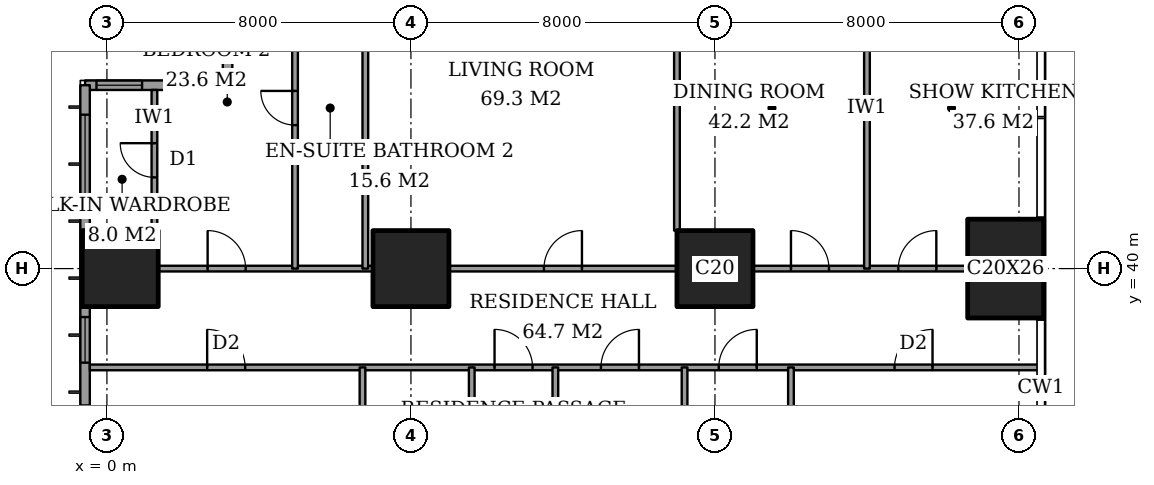
"""IFC4 building model, lengths in metres.
Left out: names, types, materials, properties, quantities, classifications, styles, units other than length and angle.
Written with IfcOpenShell. Run it as: python <this file> out.ifc"""

import sys

from ifc_helpers import new_model, si_unit, direction, frame, frame_2d, origin, origin_2d, place, context, subcontext, project, spatial, rectangle, extrude, element, fill, save


model = new_model("IFC4")
c1 = context("Model", 3, precision=1e-05, world=origin(), true_north=direction((0.0, 1.0)))
c2 = subcontext(c1, "Body", "Model", "MODEL_VIEW")
j1 = project(units=[si_unit("LENGTHUNIT", "METRE"), si_unit("PLANEANGLEUNIT", "RADIAN")], contexts=[c1])
p1 = place(None, origin())
s1 = spatial("IfcSite", under=j1, at=p1, CompositionType="ELEMENT")
p2 = place(p1, origin())
s2 = spatial("IfcBuilding", under=s1, at=p2, CompositionType="ELEMENT")
p3 = place(p2, frame((0.0, 0.0, 143.0)))
s3 = spatial("IfcBuildingStorey", under=s2, at=p3, CompositionType="ELEMENT", Elevation=143.0)
for number, where, z_axis, x_axis in (
    (1, (0.35, 40.0, 0.0), (0.0, 0.0, 1.0), (1.0, 0.0, 0.0)),
    (2, (8.0, 40.0, 0.0), (0.0, 0.0, 1.0), (1.0, 0.0, 0.0)),
    (3, (16.0, 40.0, 0.0), (0.0, 0.0, 1.0), (1.0, 0.0, 0.0)),
):
    element("IfcColumn", number, at=place(p3, frame(where, z_axis=z_axis, x_axis=x_axis)), inside=s3, PredefinedType="COLUMN", context=c2, shape_type="SweptSolid", body=[
        extrude(rectangle(XDim=2.0, YDim=2.0, at=origin_2d()), origin(), (0.0, 0.0, 1.0), 3.6),
    ])
p4 = place(p3, frame((23.65, 40.0, 0.0), z_axis=(0.0, 0.0, 1.0), x_axis=(1.0, 0.0, 0.0)))
e4 = element("IfcColumn", 4, at=p4, inside=s3, PredefinedType="COLUMN", context=c2, shape_type="SweptSolid", body=[
    extrude(rectangle(XDim=2.0, YDim=2.6, at=origin_2d()), origin(), (0.0, 0.0, 1.0), 3.6),
])
p5 = place(p3, frame((3.175, 48.575, 0.0), z_axis=(0.0, 0.0, 1.0), x_axis=(0.0, -1.0, 0.0)))
e5 = element("IfcWall", 5, at=p5, inside=s3, PredefinedType="SOLIDWALL", context=c2, shape_type="SweptSolid", body=[
    extrude(rectangle(XDim=3.75, YDim=0.25, at=frame_2d((1.875, 0.0))), origin(), (0.0, 0.0, 1.0), 3.6),
])
p6 = place(p5, frame((0.738, 0.0, 0.4)))
e6 = element("IfcOpeningElement", 6, at=p6, cuts=e5, PredefinedType="OPENING", context=c2, shape_type="SweptSolid", body=[
    extrude(rectangle(XDim=2.4, YDim=2.2, at=frame_2d((1.2, 1.1))), frame((0.0, 0.135, 0.0), z_axis=(0.0, -1.0, 0.0), x_axis=(1.0, 0.0, 0.0)), (0.0, 0.0, 1.0), 0.27),
])
p7 = place(p3, frame((3.175, 44.825, 0.0), z_axis=(0.0, 0.0, 1.0), x_axis=(-1.0, 0.0, 0.0)))
e7 = element("IfcWall", 7, at=p7, inside=s3, PredefinedType="SOLIDWALL", context=c2, shape_type="SweptSolid", body=[
    extrude(rectangle(XDim=3.75, YDim=0.25, at=frame_2d((1.875, 0.0))), origin(), (0.0, 0.0, 1.0), 3.6),
])
p8 = place(p7, frame((0.363, 0.0, 0.4)))
e8 = element("IfcOpeningElement", 8, at=p8, cuts=e7, PredefinedType="OPENING", context=c2, shape_type="SweptSolid", body=[
    extrude(rectangle(XDim=1.2, YDim=2.2, at=frame_2d((0.6, 1.1))), frame((0.0, 0.135, 0.0), z_axis=(0.0, -1.0, 0.0), x_axis=(1.0, 0.0, 0.0)), (0.0, 0.0, 1.0), 0.27),
])
p9 = place(p7, frame((2.25, 0.0, 0.4)))
e9 = element("IfcOpeningElement", 9, at=p9, cuts=e7, PredefinedType="OPENING", context=c2, shape_type="SweptSolid", body=[
    extrude(rectangle(XDim=1.2, YDim=2.2, at=frame_2d((0.6, 1.1))), frame((0.0, 0.135, 0.0), z_axis=(0.0, -1.0, 0.0), x_axis=(1.0, 0.0, 0.0)), (0.0, 0.0, 1.0), 0.27),
])
p10 = place(p3, frame((-0.575, 44.825, 0.0), z_axis=(0.0, 0.0, 1.0), x_axis=(0.0, -1.0, 0.0)))
e10 = element("IfcWall", 10, at=p10, inside=s3, PredefinedType="SOLIDWALL", context=c2, shape_type="SweptSolid", body=[
    extrude(rectangle(XDim=41.65, YDim=0.25, at=frame_2d((20.825, 0.0))), origin(), (0.0, 0.0, 1.0), 3.6),
])
p11 = place(p10, frame((0.775, 0.0, 0.4)))
e11 = element("IfcOpeningElement", 11, at=p11, cuts=e10, PredefinedType="OPENING", context=c2, shape_type="SweptSolid", body=[
    extrude(rectangle(XDim=2.4, YDim=2.2, at=frame_2d((1.2, 1.1))), frame((0.0, 0.135, 0.0), z_axis=(0.0, -1.0, 0.0), x_axis=(1.0, 0.0, 0.0)), (0.0, 0.0, 1.0), 0.27),
])
p12 = place(p10, frame((6.1, 0.0, 0.4)))
e12 = element("IfcOpeningElement", 12, at=p12, cuts=e10, PredefinedType="OPENING", context=c2, shape_type="SweptSolid", body=[
    extrude(rectangle(XDim=1.2, YDim=2.2, at=frame_2d((0.6, 1.1))), frame((0.0, 0.135, 0.0), z_axis=(0.0, -1.0, 0.0), x_axis=(1.0, 0.0, 0.0)), (0.0, 0.0, 1.0), 0.27),
])
p13 = place(p10, frame((8.425, 0.0, 0.4)))
e13 = element("IfcOpeningElement", 13, at=p13, cuts=e10, PredefinedType="OPENING", context=c2, shape_type="SweptSolid", body=[
    extrude(rectangle(XDim=2.4, YDim=2.2, at=frame_2d((1.2, 1.1))), frame((0.0, 0.135, 0.0), z_axis=(0.0, -1.0, 0.0), x_axis=(1.0, 0.0, 0.0)), (0.0, 0.0, 1.0), 0.27),
])
p14 = place(p10, frame((15.625, 0.0, 0.4)))
e14 = element("IfcOpeningElement", 14, at=p14, cuts=e10, PredefinedType="OPENING", context=c2, shape_type="SweptSolid", body=[
    extrude(rectangle(XDim=2.4, YDim=2.2, at=frame_2d((1.2, 1.1))), frame((0.0, 0.135, 0.0), z_axis=(0.0, -1.0, 0.0), x_axis=(1.0, 0.0, 0.0)), (0.0, 0.0, 1.0), 0.27),
])
p15 = place(p10, frame((23.625, 0.0, 0.4)))
e15 = element("IfcOpeningElement", 15, at=p15, cuts=e10, PredefinedType="OPENING", context=c2, shape_type="SweptSolid", body=[
    extrude(rectangle(XDim=2.4, YDim=2.2, at=frame_2d((1.2, 1.1))), frame((0.0, 0.135, 0.0), z_axis=(0.0, -1.0, 0.0), x_axis=(1.0, 0.0, 0.0)), (0.0, 0.0, 1.0), 0.27),
])
p16 = place(p10, frame((30.625, 0.0, 0.4)))
e16 = element("IfcOpeningElement", 16, at=p16, cuts=e10, PredefinedType="OPENING", context=c2, shape_type="SweptSolid", body=[
    extrude(rectangle(XDim=2.4, YDim=2.2, at=frame_2d((1.2, 1.1))), frame((0.0, 0.135, 0.0), z_axis=(0.0, -1.0, 0.0), x_axis=(1.0, 0.0, 0.0)), (0.0, 0.0, 1.0), 0.27),
])
p17 = place(p10, frame((34.225, 0.0, 0.4)))
e17 = element("IfcOpeningElement", 17, at=p17, cuts=e10, PredefinedType="OPENING", context=c2, shape_type="SweptSolid", body=[
    extrude(rectangle(XDim=1.2, YDim=2.2, at=frame_2d((0.6, 1.1))), frame((0.0, 0.135, 0.0), z_axis=(0.0, -1.0, 0.0), x_axis=(1.0, 0.0, 0.0)), (0.0, 0.0, 1.0), 0.27),
])
p18 = place(p10, frame((38.475, 0.0, 0.4)))
e18 = element("IfcOpeningElement", 18, at=p18, cuts=e10, PredefinedType="OPENING", context=c2, shape_type="SweptSolid", body=[
    extrude(rectangle(XDim=2.4, YDim=2.2, at=frame_2d((1.2, 1.1))), frame((0.0, 0.135, 0.0), z_axis=(0.0, -1.0, 0.0), x_axis=(1.0, 0.0, 0.0)), (0.0, 0.0, 1.0), 0.27),
])
p19 = place(p3, frame((-0.45, 37.4, 0.0), z_axis=(0.0, 0.0, 1.0), x_axis=(1.0, 0.0, 0.0)))
e19 = element("IfcWall", 19, at=p19, inside=s3, PredefinedType="PARTITIONING", context=c2, shape_type="SweptSolid", body=[
    extrude(rectangle(XDim=25.011, YDim=0.15, at=frame_2d((12.505, 0.0))), origin(), (0.0, 0.0, 1.0), 3.35),
])
p20 = place(p19, frame((10.65, 0.0, 0.0)))
e20 = element("IfcOpeningElement", 20, at=p20, cuts=e19, PredefinedType="OPENING", context=c2, shape_type="SweptSolid", body=[
    extrude(rectangle(XDim=1.0, YDim=2.1, at=frame_2d((0.5, 1.05))), frame((0.0, 0.085, 0.0), z_axis=(0.0, -1.0, 0.0), x_axis=(1.0, 0.0, 0.0)), (0.0, 0.0, 1.0), 0.17),
])
p21 = place(p19, frame((3.087, 0.0, 0.0)))
e21 = element("IfcOpeningElement", 21, at=p21, cuts=e19, PredefinedType="OPENING", context=c2, shape_type="SweptSolid", body=[
    extrude(rectangle(XDim=1.0, YDim=2.1, at=frame_2d((0.5, 1.05))), frame((0.0, 0.085, 0.0), z_axis=(0.0, -1.0, 0.0), x_axis=(1.0, 0.0, 0.0)), (0.0, 0.0, 1.0), 0.17),
])
p22 = place(p19, frame((13.45, 0.0, 0.0)))
e22 = element("IfcOpeningElement", 22, at=p22, cuts=e19, PredefinedType="OPENING", context=c2, shape_type="SweptSolid", body=[
    extrude(rectangle(XDim=1.0, YDim=2.1, at=frame_2d((0.5, 1.05))), frame((0.0, 0.085, 0.0), z_axis=(0.0, -1.0, 0.0), x_axis=(1.0, 0.0, 0.0)), (0.0, 0.0, 1.0), 0.17),
])
p23 = place(p19, frame((16.55, 0.0, 0.0)))
e23 = element("IfcOpeningElement", 23, at=p23, cuts=e19, PredefinedType="OPENING", context=c2, shape_type="SweptSolid", body=[
    extrude(rectangle(XDim=1.0, YDim=2.1, at=frame_2d((0.5, 1.05))), frame((0.0, 0.085, 0.0), z_axis=(0.0, -1.0, 0.0), x_axis=(1.0, 0.0, 0.0)), (0.0, 0.0, 1.0), 0.17),
])
p24 = place(p19, frame((21.175, 0.0, 0.0)))
e24 = element("IfcOpeningElement", 24, at=p24, cuts=e19, PredefinedType="OPENING", context=c2, shape_type="SweptSolid", body=[
    extrude(rectangle(XDim=1.0, YDim=2.1, at=frame_2d((0.5, 1.05))), frame((0.0, 0.085, 0.0), z_axis=(0.0, -1.0, 0.0), x_axis=(1.0, 0.0, 0.0)), (0.0, 0.0, 1.0), 0.17),
])
p25 = place(p3, frame((1.35, 40.0, 0.0), z_axis=(0.0, 0.0, 1.0), x_axis=(1.0, 0.0, 0.0)))
e25 = element("IfcWall", 25, at=p25, inside=s3, PredefinedType="PARTITIONING", context=c2, shape_type="SweptSolid", body=[
    extrude(rectangle(XDim=5.65, YDim=0.15, at=frame_2d((2.825, 0.0))), origin(), (0.0, 0.0, 1.0), 3.35),
])
p26 = place(p25, frame((1.3, 0.0, 0.0)))
e26 = element("IfcOpeningElement", 26, at=p26, cuts=e25, PredefinedType="OPENING", context=c2, shape_type="SweptSolid", body=[
    extrude(rectangle(XDim=1.0, YDim=2.1, at=frame_2d((0.5, 1.05))), frame((0.0, 0.085, 0.0), z_axis=(0.0, -1.0, 0.0), x_axis=(1.0, 0.0, 0.0)), (0.0, 0.0, 1.0), 0.17),
])
p27 = place(p3, frame((9.0, 40.0, 0.0), z_axis=(0.0, 0.0, 1.0), x_axis=(1.0, 0.0, 0.0)))
e27 = element("IfcWall", 27, at=p27, inside=s3, PredefinedType="PARTITIONING", context=c2, shape_type="SweptSolid", body=[
    extrude(rectangle(XDim=6.0, YDim=0.15, at=frame_2d((3.0, 0.0))), origin(), (0.0, 0.0, 1.0), 3.35),
])
p28 = place(p27, frame((2.5, 0.0, 0.0)))
e28 = element("IfcOpeningElement", 28, at=p28, cuts=e27, PredefinedType="OPENING", context=c2, shape_type="SweptSolid", body=[
    extrude(rectangle(XDim=1.0, YDim=2.1, at=frame_2d((0.5, 1.05))), frame((0.0, 0.085, 0.0), z_axis=(0.0, -1.0, 0.0), x_axis=(1.0, 0.0, 0.0)), (0.0, 0.0, 1.0), 0.17),
])
p29 = place(p3, frame((17.0, 40.0, 0.0), z_axis=(0.0, 0.0, 1.0), x_axis=(1.0, 0.0, 0.0)))
e29 = element("IfcWall", 29, at=p29, inside=s3, PredefinedType="PARTITIONING", context=c2, shape_type="SweptSolid", body=[
    extrude(rectangle(XDim=5.65, YDim=0.15, at=frame_2d((2.825, 0.0))), origin(), (0.0, 0.0, 1.0), 3.35),
])
p30 = place(p29, frame((1.0, 0.0, 0.0)))
e30 = element("IfcOpeningElement", 30, at=p30, cuts=e29, PredefinedType="OPENING", context=c2, shape_type="SweptSolid", body=[
    extrude(rectangle(XDim=1.0, YDim=2.1, at=frame_2d((0.5, 1.05))), frame((0.0, 0.085, 0.0), z_axis=(0.0, -1.0, 0.0), x_axis=(1.0, 0.0, 0.0)), (0.0, 0.0, 1.0), 0.17),
])
p31 = place(p29, frame((3.825, 0.0, 0.0)))
e31 = element("IfcOpeningElement", 31, at=p31, cuts=e29, PredefinedType="OPENING", context=c2, shape_type="SweptSolid", body=[
    extrude(rectangle(XDim=1.0, YDim=2.1, at=frame_2d((0.5, 1.05))), frame((0.0, 0.085, 0.0), z_axis=(0.0, -1.0, 0.0), x_axis=(1.0, 0.0, 0.0)), (0.0, 0.0, 1.0), 0.17),
])
p32 = place(p3, frame((1.25, 41.0, 0.0), z_axis=(0.0, 0.0, 1.0), x_axis=(0.0, 1.0, 0.0)))
e32 = element("IfcWall", 32, at=p32, inside=s3, PredefinedType="PARTITIONING", context=c2, shape_type="SweptSolid", body=[
    extrude(rectangle(XDim=3.7, YDim=0.15, at=frame_2d((1.85, 0.0))), origin(), (0.0, 0.0, 1.0), 3.35),
])
p33 = place(p32, frame((1.4, 0.0, 0.0)))
e33 = element("IfcOpeningElement", 33, at=p33, cuts=e32, PredefinedType="OPENING", context=c2, shape_type="SweptSolid", body=[
    extrude(rectangle(XDim=0.9, YDim=2.1, at=frame_2d((0.45, 1.05))), frame((0.0, 0.085, 0.0), z_axis=(0.0, -1.0, 0.0), x_axis=(1.0, 0.0, 0.0)), (0.0, 0.0, 1.0), 0.17),
])
p34 = place(p3, frame((4.95, 40.0, 0.0), z_axis=(0.0, 0.0, 1.0), x_axis=(0.0, 1.0, 0.0)))
e34 = element("IfcWall", 34, at=p34, inside=s3, PredefinedType="PARTITIONING", context=c2, shape_type="SweptSolid", body=[
    extrude(rectangle(XDim=8.45, YDim=0.15, at=frame_2d((4.225, 0.0))), origin(), (0.0, 0.0, 1.0), 3.35),
])
p35 = place(p34, frame((3.775, 0.0, 0.0)))
e35 = element("IfcOpeningElement", 35, at=p35, cuts=e34, PredefinedType="OPENING", context=c2, shape_type="SweptSolid", body=[
    extrude(rectangle(XDim=0.9, YDim=2.1, at=frame_2d((0.45, 1.05))), frame((0.0, 0.085, 0.0), z_axis=(0.0, -1.0, 0.0), x_axis=(1.0, 0.0, 0.0)), (0.0, 0.0, 1.0), 0.17),
])
p36 = place(p3, frame((6.725, 33.2, 0.0), z_axis=(0.0, 0.0, 1.0), x_axis=(0.0, 1.0, 0.0)))
e36 = element("IfcWall", 36, at=p36, inside=s3, PredefinedType="PARTITIONING", context=c2, shape_type="SweptSolid", body=[
    extrude(rectangle(XDim=4.2, YDim=0.15, at=frame_2d((2.1, 0.0))), origin(), (0.0, 0.0, 1.0), 3.35),
])
p37 = place(p36, frame((2.1, 0.0, 0.0)))
e37 = element("IfcOpeningElement", 37, at=p37, cuts=e36, PredefinedType="OPENING", context=c2, shape_type="SweptSolid", body=[
    extrude(rectangle(XDim=0.9, YDim=2.1, at=frame_2d((0.45, 1.05))), frame((0.0, 0.085, 0.0), z_axis=(0.0, -1.0, 0.0), x_axis=(1.0, 0.0, 0.0)), (0.0, 0.0, 1.0), 0.17),
])
p38 = place(p3, frame((6.8, 40.0, 0.0), z_axis=(0.0, 0.0, 1.0), x_axis=(0.0, 1.0, 0.0)))
e38 = element("IfcWall", 38, at=p38, inside=s3, PredefinedType="PARTITIONING", context=c2, shape_type="SweptSolid", body=[
    extrude(rectangle(XDim=8.45, YDim=0.15, at=frame_2d((4.225, 0.0))), origin(), (0.0, 0.0, 1.0), 3.35),
])
p39 = place(p3, frame((9.6, 28.0, 0.0), z_axis=(0.0, 0.0, 1.0), x_axis=(0.0, 1.0, 0.0)))
e39 = element("IfcWall", 39, at=p39, inside=s3, PredefinedType="PARTITIONING", context=c2, shape_type="SweptSolid", body=[
    extrude(rectangle(XDim=9.4, YDim=0.15, at=frame_2d((4.7, 0.0))), origin(), (0.0, 0.0, 1.0), 3.35),
])
p40 = place(p39, frame((0.5, 0.0, 0.0)))
e40 = element("IfcOpeningElement", 40, at=p40, cuts=e39, PredefinedType="OPENING", context=c2, shape_type="SweptSolid", body=[
    extrude(rectangle(XDim=1.0, YDim=2.1, at=frame_2d((0.5, 1.05))), frame((0.0, 0.085, 0.0), z_axis=(0.0, -1.0, 0.0), x_axis=(1.0, 0.0, 0.0)), (0.0, 0.0, 1.0), 0.17),
])
p41 = place(p3, frame((11.8, 30.0, 0.0), z_axis=(0.0, 0.0, 1.0), x_axis=(0.0, 1.0, 0.0)))
e41 = element("IfcWall", 41, at=p41, inside=s3, PredefinedType="PARTITIONING", context=c2, shape_type="SweptSolid", body=[
    extrude(rectangle(XDim=7.4, YDim=0.15, at=frame_2d((3.7, 0.0))), origin(), (0.0, 0.0, 1.0), 3.35),
])
p42 = place(p3, frame((15.0, 41.0, 0.0), z_axis=(0.0, 0.0, 1.0), x_axis=(0.0, 1.0, 0.0)))
e42 = element("IfcWall", 42, at=p42, inside=s3, PredefinedType="PARTITIONING", context=c2, shape_type="SweptSolid", body=[
    extrude(rectangle(XDim=5.65, YDim=0.15, at=frame_2d((2.825, 0.0))), origin(), (0.0, 0.0, 1.0), 3.35),
])
p43 = place(p3, frame((15.2, 33.2, 0.0), z_axis=(0.0, 0.0, 1.0), x_axis=(0.0, 1.0, 0.0)))
e43 = element("IfcWall", 43, at=p43, inside=s3, PredefinedType="PARTITIONING", context=c2, shape_type="SweptSolid", body=[
    extrude(rectangle(XDim=4.2, YDim=0.15, at=frame_2d((2.1, 0.0))), origin(), (0.0, 0.0, 1.0), 3.35),
])
p44 = place(p3, frame((18.0, 31.4, 0.0), z_axis=(0.0, 0.0, 1.0), x_axis=(0.0, 1.0, 0.0)))
e44 = element("IfcWall", 44, at=p44, inside=s3, PredefinedType="PARTITIONING", context=c2, shape_type="SweptSolid", body=[
    extrude(rectangle(XDim=6.0, YDim=0.15, at=frame_2d((3.0, 0.0))), origin(), (0.0, 0.0, 1.0), 3.35),
])
p45 = place(p3, frame((20.0, 40.0, 0.0), z_axis=(0.0, 0.0, 1.0), x_axis=(0.0, 1.0, 0.0)))
e45 = element("IfcWall", 45, at=p45, inside=s3, PredefinedType="PARTITIONING", context=c2, shape_type="SweptSolid", body=[
    extrude(rectangle(XDim=8.45, YDim=0.15, at=frame_2d((4.225, 0.0))), origin(), (0.0, 0.0, 1.0), 3.35),
])
p46 = place(p6, origin())
e46 = element("IfcWindow", 46, at=p46, inside=s3, PartitioningType="SINGLE_PANEL", PredefinedType="WINDOW", context=c2, shape_type="SweptSolid", body=[
    extrude(rectangle(XDim=2.4, YDim=2.2, at=frame_2d((1.2, 1.1))), frame((0.0, 0.03, 0.0), z_axis=(0.0, -1.0, 0.0), x_axis=(1.0, 0.0, 0.0)), (0.0, 0.0, 1.0), 0.06),
])
fill(e6, e46)
p47 = place(p8, origin())
e47 = element("IfcWindow", 47, at=p47, inside=s3, PartitioningType="SINGLE_PANEL", PredefinedType="WINDOW", context=c2, shape_type="SweptSolid", body=[
    extrude(rectangle(XDim=1.2, YDim=2.2, at=frame_2d((0.6, 1.1))), frame((0.0, 0.03, 0.0), z_axis=(0.0, -1.0, 0.0), x_axis=(1.0, 0.0, 0.0)), (0.0, 0.0, 1.0), 0.06),
])
fill(e8, e47)
p48 = place(p9, origin())
e48 = element("IfcWindow", 48, at=p48, inside=s3, PartitioningType="SINGLE_PANEL", PredefinedType="WINDOW", context=c2, shape_type="SweptSolid", body=[
    extrude(rectangle(XDim=1.2, YDim=2.2, at=frame_2d((0.6, 1.1))), frame((0.0, 0.03, 0.0), z_axis=(0.0, -1.0, 0.0), x_axis=(1.0, 0.0, 0.0)), (0.0, 0.0, 1.0), 0.06),
])
fill(e9, e48)
p49 = place(p11, origin())
e49 = element("IfcWindow", 49, at=p49, inside=s3, PartitioningType="SINGLE_PANEL", PredefinedType="WINDOW", context=c2, shape_type="SweptSolid", body=[
    extrude(rectangle(XDim=2.4, YDim=2.2, at=frame_2d((1.2, 1.1))), frame((0.0, 0.03, 0.0), z_axis=(0.0, -1.0, 0.0), x_axis=(1.0, 0.0, 0.0)), (0.0, 0.0, 1.0), 0.06),
])
fill(e11, e49)
p50 = place(p12, origin())
e50 = element("IfcWindow", 50, at=p50, inside=s3, PartitioningType="SINGLE_PANEL", PredefinedType="WINDOW", context=c2, shape_type="SweptSolid", body=[
    extrude(rectangle(XDim=1.2, YDim=2.2, at=frame_2d((0.6, 1.1))), frame((0.0, 0.03, 0.0), z_axis=(0.0, -1.0, 0.0), x_axis=(1.0, 0.0, 0.0)), (0.0, 0.0, 1.0), 0.06),
])
fill(e12, e50)
p51 = place(p33, origin())
e51 = element("IfcDoor", 51, at=p51, inside=s3, OperationType="SINGLE_SWING_LEFT", PredefinedType="DOOR", context=c2, shape_type="SweptSolid", body=[
    extrude(rectangle(XDim=0.9, YDim=2.1, at=frame_2d((0.45, 1.05))), frame((0.0, 0.025, 0.0), z_axis=(0.0, -1.0, 0.0), x_axis=(1.0, 0.0, 0.0)), (0.0, 0.0, 1.0), 0.05),
])
fill(e33, e51)
p52 = place(p26, origin())
e52 = element("IfcDoor", 52, at=p52, inside=s3, OperationType="SINGLE_SWING_RIGHT", PredefinedType="DOOR", context=c2, shape_type="SweptSolid", body=[
    extrude(rectangle(XDim=1.0, YDim=2.1, at=frame_2d((0.5, 1.05))), frame((0.0, 0.025, 0.0), z_axis=(0.0, -1.0, 0.0), x_axis=(1.0, 0.0, 0.0)), (0.0, 0.0, 1.0), 0.05),
])
fill(e26, e52)
p53 = place(p35, origin())
e53 = element("IfcDoor", 53, at=p53, inside=s3, OperationType="SINGLE_SWING_LEFT", PredefinedType="DOOR", context=c2, shape_type="SweptSolid", body=[
    extrude(rectangle(XDim=0.9, YDim=2.1, at=frame_2d((0.45, 1.05))), frame((0.0, 0.025, 0.0), z_axis=(0.0, -1.0, 0.0), x_axis=(1.0, 0.0, 0.0)), (0.0, 0.0, 1.0), 0.05),
])
fill(e35, e53)
p54 = place(p28, origin())
e54 = element("IfcDoor", 54, at=p54, inside=s3, OperationType="SINGLE_SWING_LEFT", PredefinedType="DOOR", context=c2, shape_type="SweptSolid", body=[
    extrude(rectangle(XDim=1.0, YDim=2.1, at=frame_2d((0.5, 1.05))), frame((0.0, 0.025, 0.0), z_axis=(0.0, -1.0, 0.0), x_axis=(1.0, 0.0, 0.0)), (0.0, 0.0, 1.0), 0.05),
])
fill(e28, e54)
p55 = place(p30, origin())
e55 = element("IfcDoor", 55, at=p55, inside=s3, OperationType="SINGLE_SWING_RIGHT", PredefinedType="DOOR", context=c2, shape_type="SweptSolid", body=[
    extrude(rectangle(XDim=1.0, YDim=2.1, at=frame_2d((0.5, 1.05))), frame((0.0, 0.025, 0.0), z_axis=(0.0, -1.0, 0.0), x_axis=(1.0, 0.0, 0.0)), (0.0, 0.0, 1.0), 0.05),
])
fill(e30, e55)
p56 = place(p31, origin())
e56 = element("IfcDoor", 56, at=p56, inside=s3, OperationType="SINGLE_SWING_LEFT", PredefinedType="DOOR", context=c2, shape_type="SweptSolid", body=[
    extrude(rectangle(XDim=1.0, YDim=2.1, at=frame_2d((0.5, 1.05))), frame((0.0, 0.025, 0.0), z_axis=(0.0, -1.0, 0.0), x_axis=(1.0, 0.0, 0.0)), (0.0, 0.0, 1.0), 0.05),
])
fill(e31, e56)
p57 = place(p20, origin())
e57 = element("IfcDoor", 57, at=p57, inside=s3, OperationType="SINGLE_SWING_RIGHT", PredefinedType="DOOR", context=c2, shape_type="SweptSolid", body=[
    extrude(rectangle(XDim=1.0, YDim=2.1, at=frame_2d((0.5, 1.05))), frame((0.0, 0.025, 0.0), z_axis=(0.0, -1.0, 0.0), x_axis=(1.0, 0.0, 0.0)), (0.0, 0.0, 1.0), 0.05),
])
fill(e20, e57)
p58 = place(p21, origin())
e58 = element("IfcDoor", 58, at=p58, inside=s3, OperationType="SINGLE_SWING_RIGHT", PredefinedType="DOOR", context=c2, shape_type="SweptSolid", body=[
    extrude(rectangle(XDim=1.0, YDim=2.1, at=frame_2d((0.5, 1.05))), frame((0.0, 0.025, 0.0), z_axis=(0.0, -1.0, 0.0), x_axis=(1.0, 0.0, 0.0)), (0.0, 0.0, 1.0), 0.05),
])
fill(e21, e58)
p59 = place(p22, origin())
e59 = element("IfcDoor", 59, at=p59, inside=s3, OperationType="SINGLE_SWING_LEFT", PredefinedType="DOOR", context=c2, shape_type="SweptSolid", body=[
    extrude(rectangle(XDim=1.0, YDim=2.1, at=frame_2d((0.5, 1.05))), frame((0.0, 0.025, 0.0), z_axis=(0.0, -1.0, 0.0), x_axis=(1.0, 0.0, 0.0)), (0.0, 0.0, 1.0), 0.05),
])
fill(e22, e59)
p60 = place(p23, origin())
e60 = element("IfcDoor", 60, at=p60, inside=s3, OperationType="SINGLE_SWING_LEFT", PredefinedType="DOOR", context=c2, shape_type="SweptSolid", body=[
    extrude(rectangle(XDim=1.0, YDim=2.1, at=frame_2d((0.5, 1.05))), frame((0.0, 0.025, 0.0), z_axis=(0.0, -1.0, 0.0), x_axis=(1.0, 0.0, 0.0)), (0.0, 0.0, 1.0), 0.05),
])
fill(e23, e60)
p61 = place(p24, origin())
e61 = element("IfcDoor", 61, at=p61, inside=s3, OperationType="SINGLE_SWING_LEFT", PredefinedType="DOOR", context=c2, shape_type="SweptSolid", body=[
    extrude(rectangle(XDim=1.0, YDim=2.1, at=frame_2d((0.5, 1.05))), frame((0.0, 0.025, 0.0), z_axis=(0.0, -1.0, 0.0), x_axis=(1.0, 0.0, 0.0)), (0.0, 0.0, 1.0), 0.05),
])
fill(e24, e61)
save(model, sys.argv[1])
